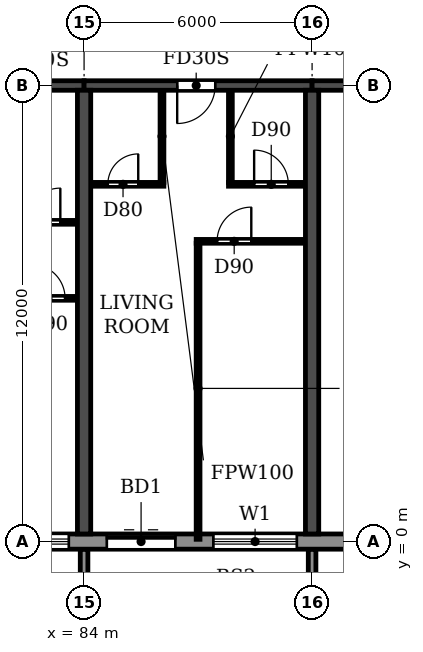
"""IFC4 building model, lengths in metres.
Left out: names, types, materials, properties, quantities, classifications, styles, units other than length and angle.
Written with IfcOpenShell. Run it as: python <this file> out.ifc"""

import sys

from ifc_helpers import new_model, si_unit, direction, frame, frame_2d, origin, place, context, subcontext, project, spatial, polyline, rectangle, outline, extrude, source, transform, mapped, element, fill, save


model = new_model("IFC4")
c1 = context("Model", 3, precision=1e-05, world=origin(), true_north=direction((0.0, 1.0)))
c2 = subcontext(c1, "Body", "Model", "MODEL_VIEW")
j1 = project(units=[si_unit("LENGTHUNIT", "METRE"), si_unit("PLANEANGLEUNIT", "RADIAN")], contexts=[c1])
p1 = place(None, origin())
s1 = spatial("IfcSite", under=j1, at=p1, CompositionType="ELEMENT")
p2 = place(p1, origin())
s2 = spatial("IfcBuilding", under=s1, at=p2, CompositionType="ELEMENT")
p3 = place(p2, frame((0.0, 0.0, 82.8)))
s3 = spatial("IfcBuildingStorey", under=s2, at=p3, CompositionType="ELEMENT", Elevation=82.8)
for number, where, z_axis, x_axis in (
    (1, (84.0, 0.2, 0.0), (0.0, 0.0, 1.0), (0.0, 1.0, 0.0)),
    (2, (90.0, 0.2, 0.0), (0.0, 0.0, 1.0), (0.0, 1.0, 0.0)),
):
    element("IfcWall", number, at=place(p3, frame(where, z_axis=z_axis, x_axis=x_axis)), inside=s3, PredefinedType="SHEAR", context=c2, shape_type="SweptSolid", body=[
        extrude(rectangle(XDim=11.675, YDim=0.35, at=frame_2d((5.837, 0.0))), origin(), (0.0, 0.0, 1.0), 3.06),
    ])
p4 = place(p3, frame((78.0, 12.0, 0.0), z_axis=(0.0, 0.0, 1.0), x_axis=(1.0, 0.0, 0.0)))
e3 = element("IfcWall", 3, at=p4, inside=s3, PredefinedType="SHEAR", context=c2, shape_type="SweptSolid", body=[
    extrude(rectangle(XDim=6.0, YDim=0.25, at=frame_2d((3.0, 0.0))), origin(), (0.0, 0.0, 1.0), 2.46),
])
p5 = place(p4, frame((2.45, 0.0, 0.0)))
e4 = element("IfcOpeningElement", 4, at=p5, cuts=e3, PredefinedType="OPENING", context=c2, shape_type="SweptSolid", body=[
    extrude(rectangle(XDim=1.0, YDim=2.1, at=frame_2d((0.5, 1.05))), frame((0.0, 0.135, 0.0), z_axis=(0.0, -1.0, 0.0), x_axis=(1.0, 0.0, 0.0)), (0.0, 0.0, 1.0), 0.27),
])
p6 = place(p3, frame((84.0, 12.0, 0.0), z_axis=(0.0, 0.0, 1.0), x_axis=(1.0, 0.0, 0.0)))
e5 = element("IfcWall", 5, at=p6, inside=s3, PredefinedType="SHEAR", context=c2, shape_type="SweptSolid", body=[
    extrude(rectangle(XDim=6.0, YDim=0.25, at=frame_2d((3.0, 0.0))), origin(), (0.0, 0.0, 1.0), 2.46),
])
p7 = place(p6, frame((2.45, 0.0, 0.0)))
e6 = element("IfcOpeningElement", 6, at=p7, cuts=e5, PredefinedType="OPENING", context=c2, shape_type="SweptSolid", body=[
    extrude(rectangle(XDim=1.0, YDim=2.1, at=frame_2d((0.5, 1.05))), frame((0.0, 0.135, 0.0), z_axis=(0.0, -1.0, 0.0), x_axis=(1.0, 0.0, 0.0)), (0.0, 0.0, 1.0), 0.27),
])
p8 = place(p3, frame((90.0, 12.0, 0.0), z_axis=(0.0, 0.0, 1.0), x_axis=(1.0, 0.0, 0.0)))
e7 = element("IfcWall", 7, at=p8, inside=s3, PredefinedType="SHEAR", context=c2, shape_type="SweptSolid", body=[
    extrude(rectangle(XDim=5.8, YDim=0.25, at=frame_2d((2.9, 0.0))), origin(), (0.0, 0.0, 1.0), 2.46),
])
p9 = place(p8, frame((2.5, 0.0, 0.0)))
e8 = element("IfcOpeningElement", 8, at=p9, cuts=e7, PredefinedType="OPENING", context=c2, shape_type="SweptSolid", body=[
    extrude(rectangle(XDim=1.0, YDim=2.1, at=frame_2d((0.5, 1.05))), frame((0.0, 0.135, 0.0), z_axis=(0.0, -1.0, 0.0), x_axis=(1.0, 0.0, 0.0)), (0.0, 0.0, 1.0), 0.27),
])
p10 = place(p3, frame((10.683, 0.0, 0.0), z_axis=(0.0, 0.0, 1.0), x_axis=(1.0, 0.0, 0.0)))
e9 = element("IfcWall", 9, at=p10, inside=s3, PredefinedType="STANDARD", context=c2, shape_type="SweptSolid", body=[
    extrude(rectangle(XDim=80.634, YDim=0.4, at=frame_2d((40.317, 0.0))), origin(), (0.0, 0.0, 1.0), 3.06),
])
p11 = place(p10, frame((1.717, 0.0, 0.9)))
e10 = element("IfcOpeningElement", 10, at=p11, cuts=e9, PredefinedType="OPENING", context=c2, shape_type="SweptSolid", body=[
    extrude(rectangle(XDim=2.2, YDim=1.5, at=frame_2d((1.1, 0.75))), frame((0.0, 0.21, 0.0), z_axis=(0.0, -1.0, 0.0), x_axis=(1.0, 0.0, 0.0)), (0.0, 0.0, 1.0), 0.42),
])
p12 = place(p10, frame((4.917, 0.0, 0.0)))
e11 = element("IfcOpeningElement", 11, at=p12, cuts=e9, PredefinedType="OPENING", context=c2, shape_type="SweptSolid", body=[
    extrude(rectangle(XDim=1.8, YDim=2.4, at=frame_2d((0.9, 1.2))), frame((0.0, 0.21, 0.0), z_axis=(0.0, -1.0, 0.0), x_axis=(1.0, 0.0, 0.0)), (0.0, 0.0, 1.0), 0.42),
])
p13 = place(p10, frame((7.717, 0.0, 0.9)))
e12 = element("IfcOpeningElement", 12, at=p13, cuts=e9, PredefinedType="OPENING", context=c2, shape_type="SweptSolid", body=[
    extrude(rectangle(XDim=2.2, YDim=1.5, at=frame_2d((1.1, 0.75))), frame((0.0, 0.21, 0.0), z_axis=(0.0, -1.0, 0.0), x_axis=(1.0, 0.0, 0.0)), (0.0, 0.0, 1.0), 0.42),
])
p14 = place(p10, frame((10.717, 0.0, 0.9)))
e13 = element("IfcOpeningElement", 13, at=p14, cuts=e9, PredefinedType="OPENING", context=c2, shape_type="SweptSolid", body=[
    extrude(rectangle(XDim=2.2, YDim=1.5, at=frame_2d((1.1, 0.75))), frame((0.0, 0.21, 0.0), z_axis=(0.0, -1.0, 0.0), x_axis=(1.0, 0.0, 0.0)), (0.0, 0.0, 1.0), 0.42),
])
p15 = place(p10, frame((13.917, 0.0, 0.0)))
e14 = element("IfcOpeningElement", 14, at=p15, cuts=e9, PredefinedType="OPENING", context=c2, shape_type="SweptSolid", body=[
    extrude(rectangle(XDim=1.8, YDim=2.4, at=frame_2d((0.9, 1.2))), frame((0.0, 0.21, 0.0), z_axis=(0.0, -1.0, 0.0), x_axis=(1.0, 0.0, 0.0)), (0.0, 0.0, 1.0), 0.42),
])
p16 = place(p10, frame((16.717, 0.0, 0.9)))
e15 = element("IfcOpeningElement", 15, at=p16, cuts=e9, PredefinedType="OPENING", context=c2, shape_type="SweptSolid", body=[
    extrude(rectangle(XDim=2.2, YDim=1.5, at=frame_2d((1.1, 0.75))), frame((0.0, 0.21, 0.0), z_axis=(0.0, -1.0, 0.0), x_axis=(1.0, 0.0, 0.0)), (0.0, 0.0, 1.0), 0.42),
])
p17 = place(p10, frame((19.717, 0.0, 0.9)))
e16 = element("IfcOpeningElement", 16, at=p17, cuts=e9, PredefinedType="OPENING", context=c2, shape_type="SweptSolid", body=[
    extrude(rectangle(XDim=2.2, YDim=1.5, at=frame_2d((1.1, 0.75))), frame((0.0, 0.21, 0.0), z_axis=(0.0, -1.0, 0.0), x_axis=(1.0, 0.0, 0.0)), (0.0, 0.0, 1.0), 0.42),
])
p18 = place(p10, frame((22.717, 0.0, 0.9)))
e17 = element("IfcOpeningElement", 17, at=p18, cuts=e9, PredefinedType="OPENING", context=c2, shape_type="SweptSolid", body=[
    extrude(rectangle(XDim=2.2, YDim=1.5, at=frame_2d((1.1, 0.75))), frame((0.0, 0.21, 0.0), z_axis=(0.0, -1.0, 0.0), x_axis=(1.0, 0.0, 0.0)), (0.0, 0.0, 1.0), 0.42),
])
p19 = place(p10, frame((25.917, 0.0, 0.0)))
e18 = element("IfcOpeningElement", 18, at=p19, cuts=e9, PredefinedType="OPENING", context=c2, shape_type="SweptSolid", body=[
    extrude(rectangle(XDim=1.8, YDim=2.4, at=frame_2d((0.9, 1.2))), frame((0.0, 0.21, 0.0), z_axis=(0.0, -1.0, 0.0), x_axis=(1.0, 0.0, 0.0)), (0.0, 0.0, 1.0), 0.42),
])
p20 = place(p10, frame((28.717, 0.0, 0.9)))
e19 = element("IfcOpeningElement", 19, at=p20, cuts=e9, PredefinedType="OPENING", context=c2, shape_type="SweptSolid", body=[
    extrude(rectangle(XDim=2.2, YDim=1.5, at=frame_2d((1.1, 0.75))), frame((0.0, 0.21, 0.0), z_axis=(0.0, -1.0, 0.0), x_axis=(1.0, 0.0, 0.0)), (0.0, 0.0, 1.0), 0.42),
])
p21 = place(p10, frame((31.717, 0.0, 0.9)))
e20 = element("IfcOpeningElement", 20, at=p21, cuts=e9, PredefinedType="OPENING", context=c2, shape_type="SweptSolid", body=[
    extrude(rectangle(XDim=2.2, YDim=1.5, at=frame_2d((1.1, 0.75))), frame((0.0, 0.21, 0.0), z_axis=(0.0, -1.0, 0.0), x_axis=(1.0, 0.0, 0.0)), (0.0, 0.0, 1.0), 0.42),
])
p22 = place(p10, frame((34.717, 0.0, 0.9)))
e21 = element("IfcOpeningElement", 21, at=p22, cuts=e9, PredefinedType="OPENING", context=c2, shape_type="SweptSolid", body=[
    extrude(rectangle(XDim=2.2, YDim=1.5, at=frame_2d((1.1, 0.75))), frame((0.0, 0.21, 0.0), z_axis=(0.0, -1.0, 0.0), x_axis=(1.0, 0.0, 0.0)), (0.0, 0.0, 1.0), 0.42),
])
p23 = place(p10, frame((37.717, 0.0, 0.9)))
e22 = element("IfcOpeningElement", 22, at=p23, cuts=e9, PredefinedType="OPENING", context=c2, shape_type="SweptSolid", body=[
    extrude(rectangle(XDim=2.2, YDim=1.5, at=frame_2d((1.1, 0.75))), frame((0.0, 0.21, 0.0), z_axis=(0.0, -1.0, 0.0), x_axis=(1.0, 0.0, 0.0)), (0.0, 0.0, 1.0), 0.42),
])
p24 = place(p10, frame((40.917, 0.0, 0.0)))
e23 = element("IfcOpeningElement", 23, at=p24, cuts=e9, PredefinedType="OPENING", context=c2, shape_type="SweptSolid", body=[
    extrude(rectangle(XDim=1.8, YDim=2.4, at=frame_2d((0.9, 1.2))), frame((0.0, 0.21, 0.0), z_axis=(0.0, -1.0, 0.0), x_axis=(1.0, 0.0, 0.0)), (0.0, 0.0, 1.0), 0.42),
])
p25 = place(p10, frame((43.717, 0.0, 0.9)))
e24 = element("IfcOpeningElement", 24, at=p25, cuts=e9, PredefinedType="OPENING", context=c2, shape_type="SweptSolid", body=[
    extrude(rectangle(XDim=2.2, YDim=1.5, at=frame_2d((1.1, 0.75))), frame((0.0, 0.21, 0.0), z_axis=(0.0, -1.0, 0.0), x_axis=(1.0, 0.0, 0.0)), (0.0, 0.0, 1.0), 0.42),
])
p26 = place(p10, frame((46.717, 0.0, 0.9)))
e25 = element("IfcOpeningElement", 25, at=p26, cuts=e9, PredefinedType="OPENING", context=c2, shape_type="SweptSolid", body=[
    extrude(rectangle(XDim=2.2, YDim=1.5, at=frame_2d((1.1, 0.75))), frame((0.0, 0.21, 0.0), z_axis=(0.0, -1.0, 0.0), x_axis=(1.0, 0.0, 0.0)), (0.0, 0.0, 1.0), 0.42),
])
p27 = place(p10, frame((49.717, 0.0, 0.9)))
e26 = element("IfcOpeningElement", 26, at=p27, cuts=e9, PredefinedType="OPENING", context=c2, shape_type="SweptSolid", body=[
    extrude(rectangle(XDim=2.2, YDim=1.5, at=frame_2d((1.1, 0.75))), frame((0.0, 0.21, 0.0), z_axis=(0.0, -1.0, 0.0), x_axis=(1.0, 0.0, 0.0)), (0.0, 0.0, 1.0), 0.42),
])
p28 = place(p10, frame((52.917, 0.0, 0.0)))
e27 = element("IfcOpeningElement", 27, at=p28, cuts=e9, PredefinedType="OPENING", context=c2, shape_type="SweptSolid", body=[
    extrude(rectangle(XDim=1.8, YDim=2.4, at=frame_2d((0.9, 1.2))), frame((0.0, 0.21, 0.0), z_axis=(0.0, -1.0, 0.0), x_axis=(1.0, 0.0, 0.0)), (0.0, 0.0, 1.0), 0.42),
])
p29 = place(p10, frame((55.717, 0.0, 0.9)))
e28 = element("IfcOpeningElement", 28, at=p29, cuts=e9, PredefinedType="OPENING", context=c2, shape_type="SweptSolid", body=[
    extrude(rectangle(XDim=2.2, YDim=1.5, at=frame_2d((1.1, 0.75))), frame((0.0, 0.21, 0.0), z_axis=(0.0, -1.0, 0.0), x_axis=(1.0, 0.0, 0.0)), (0.0, 0.0, 1.0), 0.42),
])
p30 = place(p10, frame((58.717, 0.0, 0.9)))
e29 = element("IfcOpeningElement", 29, at=p30, cuts=e9, PredefinedType="OPENING", context=c2, shape_type="SweptSolid", body=[
    extrude(rectangle(XDim=2.2, YDim=1.5, at=frame_2d((1.1, 0.75))), frame((0.0, 0.21, 0.0), z_axis=(0.0, -1.0, 0.0), x_axis=(1.0, 0.0, 0.0)), (0.0, 0.0, 1.0), 0.42),
])
p31 = place(p10, frame((61.717, 0.0, 0.9)))
e30 = element("IfcOpeningElement", 30, at=p31, cuts=e9, PredefinedType="OPENING", context=c2, shape_type="SweptSolid", body=[
    extrude(rectangle(XDim=2.2, YDim=1.5, at=frame_2d((1.1, 0.75))), frame((0.0, 0.21, 0.0), z_axis=(0.0, -1.0, 0.0), x_axis=(1.0, 0.0, 0.0)), (0.0, 0.0, 1.0), 0.42),
])
p32 = place(p10, frame((64.917, 0.0, 0.0)))
e31 = element("IfcOpeningElement", 31, at=p32, cuts=e9, PredefinedType="OPENING", context=c2, shape_type="SweptSolid", body=[
    extrude(rectangle(XDim=1.8, YDim=2.4, at=frame_2d((0.9, 1.2))), frame((0.0, 0.21, 0.0), z_axis=(0.0, -1.0, 0.0), x_axis=(1.0, 0.0, 0.0)), (0.0, 0.0, 1.0), 0.42),
])
p33 = place(p10, frame((67.717, 0.0, 0.9)))
e32 = element("IfcOpeningElement", 32, at=p33, cuts=e9, PredefinedType="OPENING", context=c2, shape_type="SweptSolid", body=[
    extrude(rectangle(XDim=2.2, YDim=1.5, at=frame_2d((1.1, 0.75))), frame((0.0, 0.21, 0.0), z_axis=(0.0, -1.0, 0.0), x_axis=(1.0, 0.0, 0.0)), (0.0, 0.0, 1.0), 0.42),
])
p34 = place(p10, frame((70.717, 0.0, 0.9)))
e33 = element("IfcOpeningElement", 33, at=p34, cuts=e9, PredefinedType="OPENING", context=c2, shape_type="SweptSolid", body=[
    extrude(rectangle(XDim=2.2, YDim=1.5, at=frame_2d((1.1, 0.75))), frame((0.0, 0.21, 0.0), z_axis=(0.0, -1.0, 0.0), x_axis=(1.0, 0.0, 0.0)), (0.0, 0.0, 1.0), 0.42),
])
p35 = place(p10, frame((73.917, 0.0, 0.0)))
e34 = element("IfcOpeningElement", 34, at=p35, cuts=e9, PredefinedType="OPENING", context=c2, shape_type="SweptSolid", body=[
    extrude(rectangle(XDim=1.8, YDim=2.4, at=frame_2d((0.9, 1.2))), frame((0.0, 0.21, 0.0), z_axis=(0.0, -1.0, 0.0), x_axis=(1.0, 0.0, 0.0)), (0.0, 0.0, 1.0), 0.42),
])
p36 = place(p10, frame((76.717, 0.0, 0.9)))
e35 = element("IfcOpeningElement", 35, at=p36, cuts=e9, PredefinedType="OPENING", context=c2, shape_type="SweptSolid", body=[
    extrude(rectangle(XDim=2.2, YDim=1.5, at=frame_2d((1.1, 0.75))), frame((0.0, 0.21, 0.0), z_axis=(0.0, -1.0, 0.0), x_axis=(1.0, 0.0, 0.0)), (0.0, 0.0, 1.0), 0.42),
])
m1 = source(origin(), c2, "Body", "SweptSolid", [
    extrude(outline(polyline([(0.0, 0.0), (0.2, 0.0), (0.2, 1.65), (0.0, 1.65), (0.0, 0.0)])), origin(), (0.0, 0.0, 1.0), 3.1),
])
for number, where in (
    (36, (83.9, -1.85, 0.0)),
    (37, (89.9, -1.85, 0.0)),
):
    element("IfcWall", number, at=place(p3, frame(where)), inside=s3, PredefinedType="STANDARD", context=c2, shape_type="MappedRepresentation", body=[
        mapped(m1, transform((0.0, 0.0, 0.0))),
    ])
p37 = place(p3, frame((80.95, 6.4, 0.0), z_axis=(0.0, 0.0, 1.0), x_axis=(1.0, 0.0, 0.0)))
e38 = element("IfcWall", 38, at=p37, inside=s3, PredefinedType="PARTITIONING", context=c2, shape_type="SweptSolid", body=[
    extrude(rectangle(XDim=2.865, YDim=0.1, at=frame_2d((1.433, 0.0))), origin(), (0.0, 0.0, 1.0), 3.06),
])
p38 = place(p37, frame((1.65, 0.0, 0.0)))
e39 = element("IfcOpeningElement", 39, at=p38, cuts=e38, PredefinedType="OPENING", context=c2, shape_type="SweptSolid", body=[
    extrude(rectangle(XDim=0.9, YDim=2.1, at=frame_2d((0.45, 1.05))), frame((0.0, 0.06, 0.0), z_axis=(0.0, -1.0, 0.0), x_axis=(1.0, 0.0, 0.0)), (0.0, 0.0, 1.0), 0.12),
])
p39 = place(p3, frame((86.95, 7.9, 0.0), z_axis=(0.0, 0.0, 1.0), x_axis=(1.0, 0.0, 0.0)))
e40 = element("IfcWall", 40, at=p39, inside=s3, PredefinedType="PARTITIONING", context=c2, shape_type="SweptSolid", body=[
    extrude(rectangle(XDim=2.865, YDim=0.1, at=frame_2d((1.433, 0.0))), origin(), (0.0, 0.0, 1.0), 3.06),
])
p40 = place(p39, frame((0.55, 0.0, 0.0)))
e41 = element("IfcOpeningElement", 41, at=p40, cuts=e40, PredefinedType="OPENING", context=c2, shape_type="SweptSolid", body=[
    extrude(rectangle(XDim=0.9, YDim=2.1, at=frame_2d((0.45, 1.05))), frame((0.0, 0.06, 0.0), z_axis=(0.0, -1.0, 0.0), x_axis=(1.0, 0.0, 0.0)), (0.0, 0.0, 1.0), 0.12),
])
p41 = place(p3, frame((81.8, 8.4, 0.0), z_axis=(0.0, 0.0, 1.0), x_axis=(1.0, 0.0, 0.0)))
e42 = element("IfcWall", 42, at=p41, inside=s3, PredefinedType="PARTITIONING", context=c2, shape_type="SweptSolid", body=[
    extrude(rectangle(XDim=2.015, YDim=0.1, at=frame_2d((1.007, 0.0))), origin(), (0.0, 0.0, 1.0), 3.06),
])
p42 = place(p41, frame((0.675, 0.0, 0.0)))
e43 = element("IfcOpeningElement", 43, at=p42, cuts=e42, PredefinedType="OPENING", context=c2, shape_type="SweptSolid", body=[
    extrude(rectangle(XDim=0.9, YDim=2.1, at=frame_2d((0.45, 1.05))), frame((0.0, 0.06, 0.0), z_axis=(0.0, -1.0, 0.0), x_axis=(1.0, 0.0, 0.0)), (0.0, 0.0, 1.0), 0.12),
])
p43 = place(p3, frame((84.185, 9.4, 0.0), z_axis=(0.0, 0.0, 1.0), x_axis=(1.0, 0.0, 0.0)))
e44 = element("IfcWall", 44, at=p43, inside=s3, PredefinedType="PARTITIONING", context=c2, shape_type="SweptSolid", body=[
    extrude(rectangle(XDim=1.915, YDim=0.1, at=frame_2d((0.958, 0.0))), origin(), (0.0, 0.0, 1.0), 3.06),
])
p44 = place(p43, frame((0.44, 0.0, 0.0)))
e45 = element("IfcOpeningElement", 45, at=p44, cuts=e44, PredefinedType="OPENING", context=c2, shape_type="SweptSolid", body=[
    extrude(rectangle(XDim=0.8, YDim=2.1, at=frame_2d((0.4, 1.05))), frame((0.0, 0.06, 0.0), z_axis=(0.0, -1.0, 0.0), x_axis=(1.0, 0.0, 0.0)), (0.0, 0.0, 1.0), 0.12),
])
p45 = place(p3, frame((87.8, 9.4, 0.0), z_axis=(0.0, 0.0, 1.0), x_axis=(1.0, 0.0, 0.0)))
e46 = element("IfcWall", 46, at=p45, inside=s3, PredefinedType="PARTITIONING", context=c2, shape_type="SweptSolid", body=[
    extrude(rectangle(XDim=2.015, YDim=0.1, at=frame_2d((1.007, 0.0))), origin(), (0.0, 0.0, 1.0), 3.06),
])
p46 = place(p45, frame((0.675, 0.0, 0.0)))
e47 = element("IfcOpeningElement", 47, at=p46, cuts=e46, PredefinedType="OPENING", context=c2, shape_type="SweptSolid", body=[
    extrude(rectangle(XDim=0.9, YDim=2.1, at=frame_2d((0.45, 1.05))), frame((0.0, 0.06, 0.0), z_axis=(0.0, -1.0, 0.0), x_axis=(1.0, 0.0, 0.0)), (0.0, 0.0, 1.0), 0.12),
])
p47 = place(p3, frame((86.05, 9.45, 0.0), z_axis=(0.0, 0.0, 1.0), x_axis=(0.0, 1.0, 0.0)))
e48 = element("IfcWall", 48, at=p47, inside=s3, PredefinedType="PARTITIONING", context=c2, shape_type="SweptSolid", body=[
    extrude(rectangle(XDim=2.415, YDim=0.1, at=frame_2d((1.208, 0.0))), origin(), (0.0, 0.0, 1.0), 3.06),
])
p48 = place(p3, frame((87.0, 0.06, 0.0), z_axis=(0.0, 0.0, 1.0), x_axis=(0.0, 1.0, 0.0)))
e49 = element("IfcWall", 49, at=p48, inside=s3, PredefinedType="PARTITIONING", context=c2, shape_type="SweptSolid", body=[
    extrude(rectangle(XDim=7.79, YDim=0.1, at=frame_2d((3.895, 0.0))), origin(), (0.0, 0.0, 1.0), 3.06),
])
p49 = place(p3, frame((87.85, 9.45, 0.0), z_axis=(0.0, 0.0, 1.0), x_axis=(0.0, 1.0, 0.0)))
e50 = element("IfcWall", 50, at=p49, inside=s3, PredefinedType="PARTITIONING", context=c2, shape_type="SweptSolid", body=[
    extrude(rectangle(XDim=2.415, YDim=0.1, at=frame_2d((1.208, 0.0))), origin(), (0.0, 0.0, 1.0), 3.06),
])
p50 = place(p34, origin())
e51 = element("IfcWindow", 51, at=p50, inside=s3, PartitioningType="DOUBLE_PANEL_HORIZONTAL", PredefinedType="WINDOW", context=c2, shape_type="SweptSolid", body=[
    extrude(rectangle(XDim=2.2, YDim=1.5, at=frame_2d((1.1, 0.75))), frame((0.0, 0.03, 0.0), z_axis=(0.0, -1.0, 0.0), x_axis=(1.0, 0.0, 0.0)), (0.0, 0.0, 1.0), 0.06),
])
fill(e33, e51)
p51 = place(p35, origin())
e52 = element("IfcDoor", 52, at=p51, inside=s3, OperationType="DOUBLE_DOOR_SLIDING", PredefinedType="DOOR", context=c2, shape_type="SweptSolid", body=[
    extrude(rectangle(XDim=1.8, YDim=2.4, at=frame_2d((0.9, 1.2))), frame((0.0, 0.025, 0.0), z_axis=(0.0, -1.0, 0.0), x_axis=(1.0, 0.0, 0.0)), (0.0, 0.0, 1.0), 0.05),
])
fill(e34, e52)
p52 = place(p36, origin())
e53 = element("IfcWindow", 53, at=p52, inside=s3, PartitioningType="DOUBLE_PANEL_HORIZONTAL", PredefinedType="WINDOW", context=c2, shape_type="SweptSolid", body=[
    extrude(rectangle(XDim=2.2, YDim=1.5, at=frame_2d((1.1, 0.75))), frame((0.0, 0.03, 0.0), z_axis=(0.0, -1.0, 0.0), x_axis=(1.0, 0.0, 0.0)), (0.0, 0.0, 1.0), 0.06),
])
fill(e35, e53)
p53 = place(p42, origin())
e54 = element("IfcDoor", 54, at=p53, inside=s3, OperationType="SINGLE_SWING_RIGHT", PredefinedType="DOOR", context=c2, shape_type="SweptSolid", body=[
    extrude(rectangle(XDim=0.9, YDim=2.1, at=frame_2d((0.45, 1.05))), frame((0.0, 0.025, 0.0), z_axis=(0.0, -1.0, 0.0), x_axis=(1.0, 0.0, 0.0)), (0.0, 0.0, 1.0), 0.05),
])
fill(e43, e54)
p54 = place(p38, origin())
e55 = element("IfcDoor", 55, at=p54, inside=s3, OperationType="SINGLE_SWING_LEFT", PredefinedType="DOOR", context=c2, shape_type="SweptSolid", body=[
    extrude(rectangle(XDim=0.9, YDim=2.1, at=frame_2d((0.45, 1.05))), frame((0.0, 0.025, 0.0), z_axis=(0.0, -1.0, 0.0), x_axis=(1.0, 0.0, 0.0)), (0.0, 0.0, 1.0), 0.05),
])
fill(e39, e55)
p55 = place(p44, origin())
e56 = element("IfcDoor", 56, at=p55, inside=s3, OperationType="SINGLE_SWING_RIGHT", PredefinedType="DOOR", context=c2, shape_type="SweptSolid", body=[
    extrude(rectangle(XDim=0.8, YDim=2.1, at=frame_2d((0.4, 1.05))), frame((0.0, 0.025, 0.0), z_axis=(0.0, -1.0, 0.0), x_axis=(1.0, 0.0, 0.0)), (0.0, 0.0, 1.0), 0.05),
])
fill(e45, e56)
p56 = place(p7, frame((1.0, 0.0, 0.0), z_axis=(0.0, 0.0, 1.0), x_axis=(-1.0, 0.0, 0.0)))
e57 = element("IfcDoor", 57, at=p56, inside=s3, OperationType="SINGLE_SWING_RIGHT", PredefinedType="DOOR", context=c2, shape_type="SweptSolid", body=[
    extrude(rectangle(XDim=1.0, YDim=2.1, at=frame_2d((0.5, 1.05))), frame((0.0, 0.025, 0.0), z_axis=(0.0, -1.0, 0.0), x_axis=(1.0, 0.0, 0.0)), (0.0, 0.0, 1.0), 0.05),
])
fill(e6, e57)
p57 = place(p40, origin())
e58 = element("IfcDoor", 58, at=p57, inside=s3, OperationType="SINGLE_SWING_RIGHT", PredefinedType="DOOR", context=c2, shape_type="SweptSolid", body=[
    extrude(rectangle(XDim=0.9, YDim=2.1, at=frame_2d((0.45, 1.05))), frame((0.0, 0.025, 0.0), z_axis=(0.0, -1.0, 0.0), x_axis=(1.0, 0.0, 0.0)), (0.0, 0.0, 1.0), 0.05),
])
fill(e41, e58)
p58 = place(p46, origin())
e59 = element("IfcDoor", 59, at=p58, inside=s3, OperationType="SINGLE_SWING_LEFT", PredefinedType="DOOR", context=c2, shape_type="SweptSolid", body=[
    extrude(rectangle(XDim=0.9, YDim=2.1, at=frame_2d((0.45, 1.05))), frame((0.0, 0.025, 0.0), z_axis=(0.0, -1.0, 0.0), x_axis=(1.0, 0.0, 0.0)), (0.0, 0.0, 1.0), 0.05),
])
fill(e47, e59)
save(model, sys.argv[1])
